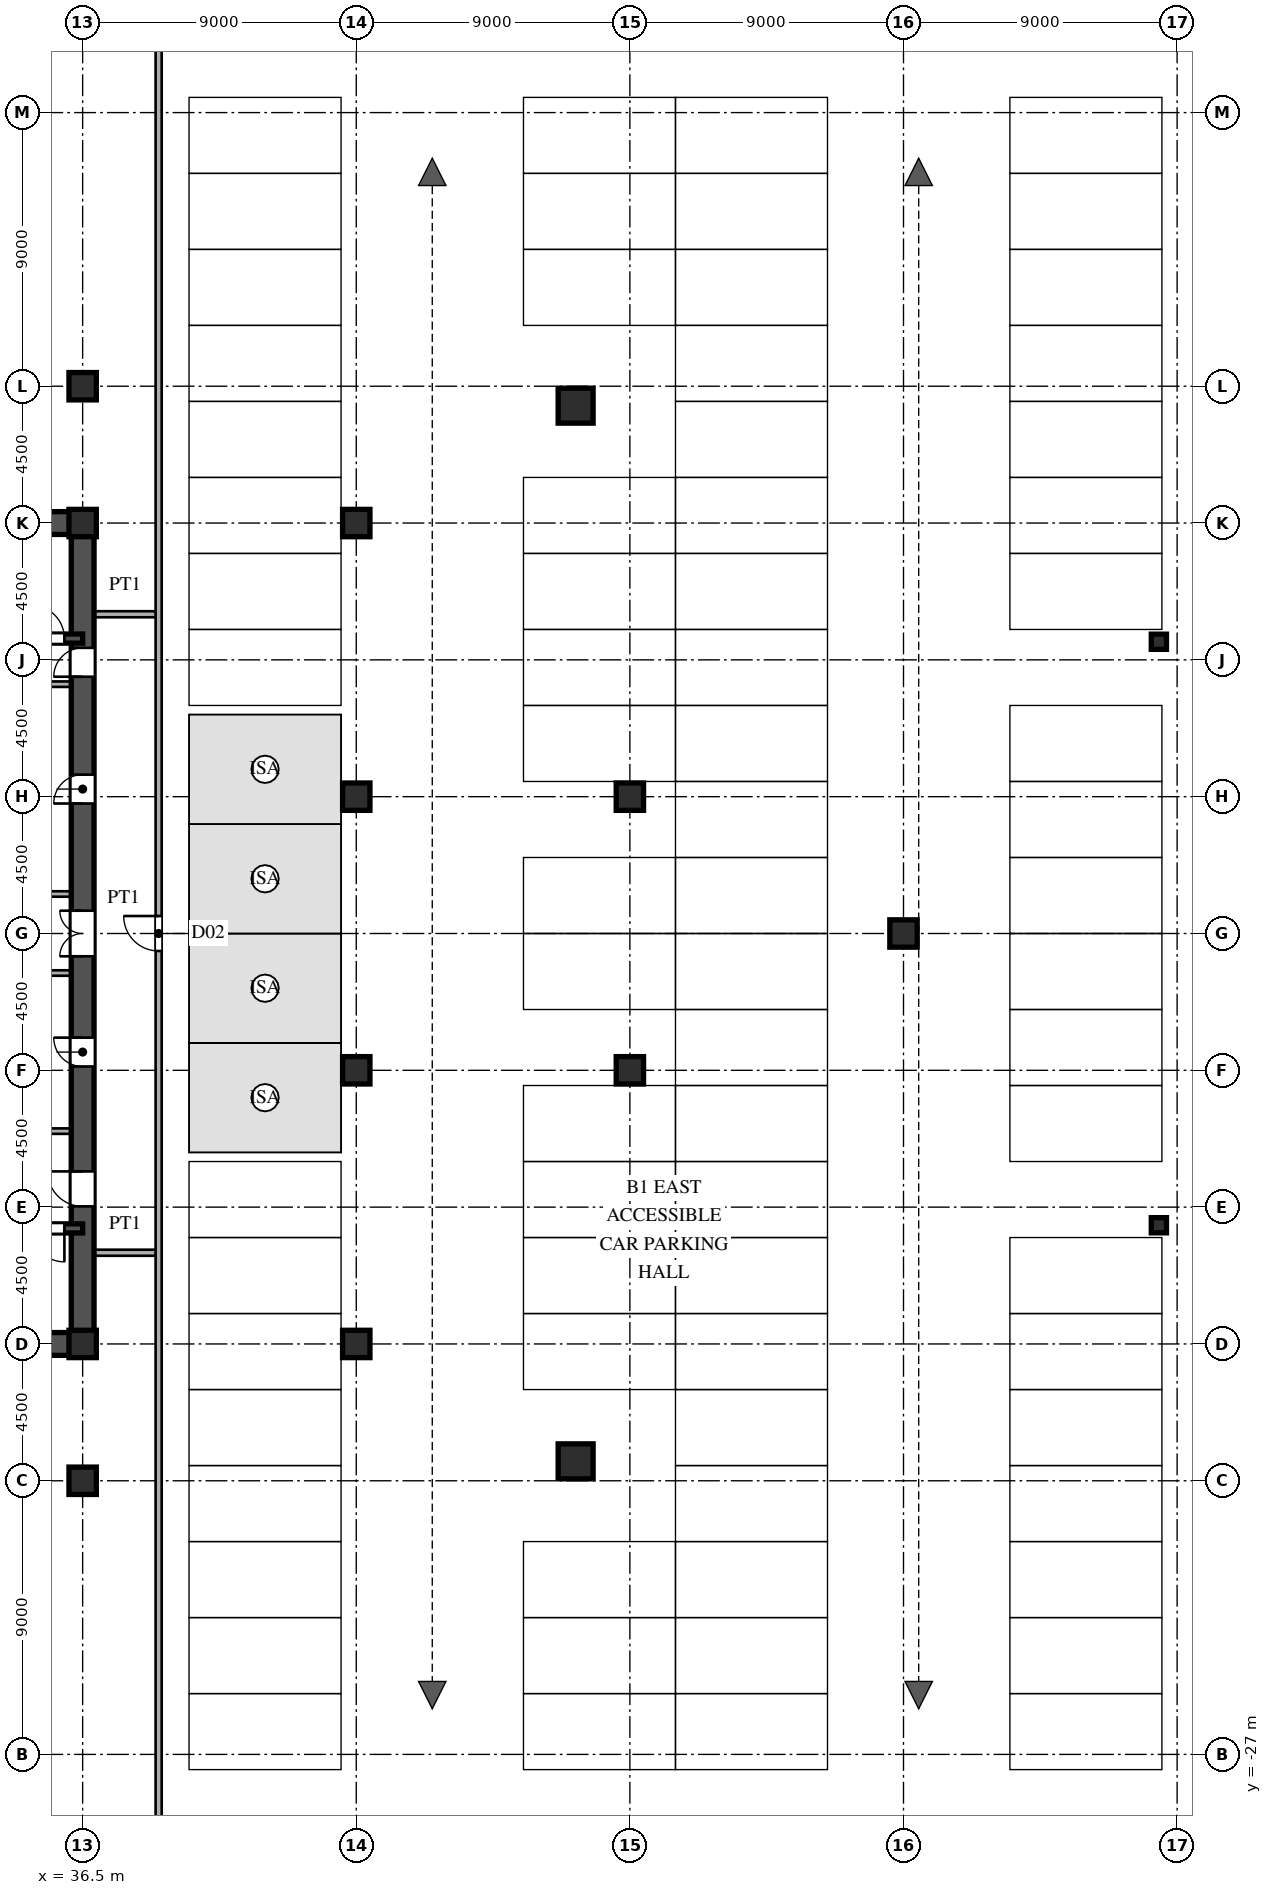
"""IFC4 building model, lengths in metres.
Left out: names, types, materials, properties, quantities, classifications, styles, units other than length and angle.
Written with IfcOpenShell. Run it as: python <this file> out.ifc"""

import sys

from ifc_helpers import new_model, si_unit, direction, frame, frame_2d, origin, origin_2d, place, context, subcontext, project, spatial, rectangle, hollow_rectangle, i_section, extrude, source, transform, mapped, element, fill, save


model = new_model("IFC4")
c1 = context("Model", 3, precision=1e-05, world=origin(), true_north=direction((0.0, 1.0)))
c2 = subcontext(c1, "Body", "Model", "MODEL_VIEW")
j1 = project(units=[si_unit("LENGTHUNIT", "METRE"), si_unit("PLANEANGLEUNIT", "RADIAN")], contexts=[c1])
p1 = place(None, origin())
s1 = spatial("IfcSite", under=j1, at=p1, CompositionType="ELEMENT")
p2 = place(p1, origin())
s2 = spatial("IfcBuilding", under=s1, at=p2, CompositionType="ELEMENT")
p3 = place(p2, frame((0.0, 0.0, -4.8)))
s3 = spatial("IfcBuildingStorey", under=s2, at=p3, CompositionType="ELEMENT", Elevation=-4.8)
m1 = source(origin(), c2, "Body", "SweptSolid", [
    extrude(i_section(OverallWidth=0.9, OverallDepth=0.9, WebThickness=0.036, FlangeThickness=0.055, at=origin_2d()), origin(), (0.0, 0.0, 1.0), 4.8),
])
for number, where, z_axis, x_axis in (
    (1, (36.5, -18.0, 0.0), (0.0, 0.0, 1.0), (1.0, 0.0, 0.0)),
    (2, (36.5, -13.5, 0.0), (0.0, 0.0, 1.0), (1.0, 0.0, 0.0)),
    (3, (36.5, 13.5, 0.0), (0.0, 0.0, 1.0), (1.0, 0.0, 0.0)),
    (4, (36.5, 18.0, 0.0), (0.0, 0.0, 1.0), (1.0, 0.0, 0.0)),
    (5, (45.5, -13.5, 0.0), (0.0, 0.0, 1.0), (1.0, 0.0, 0.0)),
    (6, (45.5, -4.5, 0.0), (0.0, 0.0, 1.0), (1.0, 0.0, 0.0)),
    (7, (45.5, 4.5, 0.0), (0.0, 0.0, 1.0), (1.0, 0.0, 0.0)),
    (8, (45.5, 13.5, 0.0), (0.0, 0.0, 1.0), (1.0, 0.0, 0.0)),
    (9, (54.5, -4.5, 0.0), (0.0, 0.0, 1.0), (1.0, 0.0, 0.0)),
    (10, (54.5, 4.5, 0.0), (0.0, 0.0, 1.0), (1.0, 0.0, 0.0)),
    (11, (63.5, 0.0, 0.0), (0.0, 0.0, 1.0), (1.0, 0.0, 0.0)),
):
    element("IfcColumn", number, at=place(p3, frame(where, z_axis=z_axis, x_axis=x_axis)), inside=s3, PredefinedType="COLUMN", context=c2, shape_type="MappedRepresentation", body=[
        mapped(m1, transform((0.0, 0.0, 0.0), scale=1.0)),
    ])
m2 = source(origin(), c2, "Body", "SweptSolid", [
    extrude(hollow_rectangle(XDim=0.5, YDim=0.5, WallThickness=0.02, at=origin_2d()), origin(), (0.0, 0.0, 1.0), 4.8),
])
for number, where, z_axis, x_axis in (
    (12, (71.9, -9.596, 0.0), (0.0, 0.0, 1.0), (1.0, 0.0, 0.0)),
    (13, (71.9, 9.596, 0.0), (0.0, 0.0, 1.0), (1.0, 0.0, 0.0)),
):
    element("IfcColumn", number, at=place(p3, frame(where, z_axis=z_axis, x_axis=x_axis)), inside=s3, PredefinedType="COLUMN", context=c2, shape_type="MappedRepresentation", body=[
        mapped(m2, transform((0.0, 0.0, 0.0), scale=1.0)),
    ])
m3 = source(origin(), c2, "Body", "SweptSolid", [
    extrude(hollow_rectangle(XDim=1.15, YDim=1.15, WallThickness=0.048, at=origin_2d()), origin(), (0.0, 0.0, 1.0), 4.8),
])
for number, where, z_axis, x_axis in (
    (14, (52.716, -17.361, 0.0), (0.0, 0.0, 1.0), (1.0, 0.0, 0.0)),
    (15, (52.716, 17.361, 0.0), (0.0, 0.0, 1.0), (1.0, 0.0, 0.0)),
):
    element("IfcColumn", number, at=place(p3, frame(where, z_axis=z_axis, x_axis=x_axis)), inside=s3, PredefinedType="COLUMN", context=c2, shape_type="MappedRepresentation", body=[
        mapped(m3, transform((0.0, 0.0, 0.0), scale=1.0)),
    ])
for number, where, z_axis, x_axis in (
    (16, (27.5, -13.5, 0.0), (0.0, 0.0, 1.0), (1.0, 0.0, 0.0)),
    (17, (27.5, 13.5, 0.0), (0.0, 0.0, 1.0), (1.0, 0.0, 0.0)),
):
    element("IfcWall", number, at=place(p3, frame(where, z_axis=z_axis, x_axis=x_axis)), inside=s3, PredefinedType="SHEAR", context=c2, shape_type="SweptSolid", body=[
        extrude(rectangle(XDim=9.0, YDim=0.75, at=frame_2d((4.5, 0.0))), origin(), (0.0, 0.0, 1.0), 4.52),
    ])
p4 = place(p3, frame((36.5, -13.65, 0.0), z_axis=(0.0, 0.0, 1.0), x_axis=(0.0, 1.0, 0.0)))
e18 = element("IfcWall", 18, at=p4, inside=s3, PredefinedType="SHEAR", context=c2, shape_type="SweptSolid", body=[
    extrude(rectangle(XDim=7.15, YDim=0.75, at=frame_2d((3.575, 0.0))), origin(), (0.0, 0.0, 1.0), 4.52),
])
p5 = place(p4, frame((4.675, 0.0, 0.0)))
e19 = element("IfcOpeningElement", 19, at=p5, cuts=e18, PredefinedType="OPENING", context=c2, shape_type="SweptSolid", body=[
    extrude(rectangle(XDim=1.15, YDim=2.2, at=frame_2d((0.575, 1.1))), frame((0.0, 0.385, 0.0), z_axis=(0.0, -1.0, 0.0), x_axis=(1.0, 0.0, 0.0)), (0.0, 0.0, 1.0), 0.77),
])
p6 = place(p3, frame((36.5, -1.3, 0.0), z_axis=(0.0, 0.0, 1.0), x_axis=(0.0, 1.0, 0.0)))
e20 = element("IfcWall", 20, at=p6, inside=s3, PredefinedType="SHEAR", context=c2, shape_type="SweptSolid", body=[
    extrude(rectangle(XDim=2.6, YDim=0.75, at=frame_2d((1.3, 0.0))), origin(), (0.0, 0.0, 1.0), 4.52),
])
p7 = place(p6, frame((0.55, 0.0, 0.0)))
e21 = element("IfcOpeningElement", 21, at=p7, cuts=e20, PredefinedType="OPENING", context=c2, shape_type="SweptSolid", body=[
    extrude(rectangle(XDim=1.5, YDim=2.3, at=frame_2d((0.75, 1.15))), frame((0.0, 0.385, 0.0), z_axis=(0.0, -1.0, 0.0), x_axis=(1.0, 0.0, 0.0)), (0.0, 0.0, 1.0), 0.77),
])
p8 = place(p3, frame((36.5, 8.2, 0.0), z_axis=(0.0, 0.0, 1.0), x_axis=(0.0, 1.0, 0.0)))
e22 = element("IfcWall", 22, at=p8, inside=s3, PredefinedType="SHEAR", context=c2, shape_type="SweptSolid", body=[
    extrude(rectangle(XDim=5.45, YDim=0.75, at=frame_2d((2.725, 0.0))), origin(), (0.0, 0.0, 1.0), 4.52),
])
p9 = place(p8, frame((0.245, 0.0, 0.0)))
e23 = element("IfcOpeningElement", 23, at=p9, cuts=e22, PredefinedType="OPENING", context=c2, shape_type="SweptSolid", body=[
    extrude(rectangle(XDim=0.95, YDim=2.15, at=frame_2d((0.475, 1.075))), frame((0.0, 0.385, 0.0), z_axis=(0.0, -1.0, 0.0), x_axis=(1.0, 0.0, 0.0)), (0.0, 0.0, 1.0), 0.77),
])
p10 = place(p3, frame((36.5, -6.5, 0.0), z_axis=(0.0, 0.0, 1.0), x_axis=(0.0, 1.0, 0.0)))
e24 = element("IfcWall", 24, at=p10, inside=s3, PredefinedType="SHEAR", context=c2, shape_type="SweptSolid", body=[
    extrude(rectangle(XDim=5.2, YDim=0.75, at=frame_2d((2.6, 0.0))), origin(), (0.0, 0.0, 1.0), 4.52),
])
p11 = place(p10, frame((2.125, 0.0, 0.0)))
e25 = element("IfcOpeningElement", 25, at=p11, cuts=e24, PredefinedType="OPENING", context=c2, shape_type="SweptSolid", body=[
    extrude(rectangle(XDim=0.95, YDim=2.15, at=frame_2d((0.475, 1.075))), frame((0.0, 0.385, 0.0), z_axis=(0.0, -1.0, 0.0), x_axis=(1.0, 0.0, 0.0)), (0.0, 0.0, 1.0), 0.77),
])
p12 = place(p3, frame((36.5, 1.3, 0.0), z_axis=(0.0, 0.0, 1.0), x_axis=(0.0, 1.0, 0.0)))
e26 = element("IfcWall", 26, at=p12, inside=s3, PredefinedType="SHEAR", context=c2, shape_type="SweptSolid", body=[
    extrude(rectangle(XDim=6.9, YDim=0.75, at=frame_2d((3.45, 0.0))), origin(), (0.0, 0.0, 1.0), 4.52),
])
p13 = place(p12, frame((2.975, 0.0, 0.0)))
e27 = element("IfcOpeningElement", 27, at=p13, cuts=e26, PredefinedType="OPENING", context=c2, shape_type="SweptSolid", body=[
    extrude(rectangle(XDim=0.95, YDim=2.15, at=frame_2d((0.475, 1.075))), frame((0.0, 0.385, 0.0), z_axis=(0.0, -1.0, 0.0), x_axis=(1.0, 0.0, 0.0)), (0.0, 0.0, 1.0), 0.77),
])
p14 = place(p3, frame((27.5, -9.7, 0.0), z_axis=(0.0, 0.0, 1.0), x_axis=(1.0, 0.0, 0.0)))
e28 = element("IfcWall", 28, at=p14, inside=s3, PredefinedType="SHEAR", context=c2, shape_type="SweptSolid", body=[
    extrude(rectangle(XDim=9.0, YDim=0.3, at=frame_2d((4.5, 0.0))), origin(), (0.0, 0.0, 1.0), 4.52),
])
p15 = place(p14, frame((7.3, 0.0, 0.0)))
e29 = element("IfcOpeningElement", 29, at=p15, cuts=e28, PredefinedType="OPENING", context=c2, shape_type="SweptSolid", body=[
    extrude(rectangle(XDim=1.1, YDim=2.2, at=frame_2d((0.55, 1.1))), frame((0.0, 0.16, 0.0), z_axis=(0.0, -1.0, 0.0), x_axis=(1.0, 0.0, 0.0)), (0.0, 0.0, 1.0), 0.32),
])
p16 = place(p3, frame((27.5, 9.7, 0.0), z_axis=(0.0, 0.0, 1.0), x_axis=(1.0, 0.0, 0.0)))
e30 = element("IfcWall", 30, at=p16, inside=s3, PredefinedType="SHEAR", context=c2, shape_type="SweptSolid", body=[
    extrude(rectangle(XDim=9.0, YDim=0.3, at=frame_2d((4.5, 0.0))), origin(), (0.0, 0.0, 1.0), 4.52),
])
p17 = place(p16, frame((7.3, 0.0, 0.0)))
e31 = element("IfcOpeningElement", 31, at=p17, cuts=e30, PredefinedType="OPENING", context=c2, shape_type="SweptSolid", body=[
    extrude(rectangle(XDim=1.1, YDim=2.2, at=frame_2d((0.55, 1.1))), frame((0.0, 0.16, 0.0), z_axis=(0.0, -1.0, 0.0), x_axis=(1.0, 0.0, 0.0)), (0.0, 0.0, 1.0), 0.32),
])
for number, where, z_axis, x_axis in (
    (32, (30.45, -6.5, 0.0), (0.0, 0.0, 1.0), (1.0, 0.0, 0.0)),
    (33, (30.45, 8.2, 0.0), (0.0, 0.0, 1.0), (1.0, 0.0, 0.0)),
):
    element("IfcWall", number, at=place(p3, frame(where, z_axis=z_axis, x_axis=x_axis)), inside=s3, PredefinedType="PARTITIONING", context=c2, shape_type="SweptSolid", body=[
        extrude(rectangle(XDim=5.7, YDim=0.18, at=frame_2d((2.85, 0.0))), origin(), (0.0, 0.0, 1.0), 4.52),
    ])
for number, where, z_axis, x_axis in (
    (34, (33.2, -1.3, 0.0), (0.0, 0.0, 1.0), (1.0, 0.0, 0.0)),
    (35, (33.2, 1.3, 0.0), (0.0, 0.0, 1.0), (1.0, 0.0, 0.0)),
):
    element("IfcWall", number, at=place(p3, frame(where, z_axis=z_axis, x_axis=x_axis)), inside=s3, PredefinedType="PARTITIONING", context=c2, shape_type="SweptSolid", body=[
        extrude(rectangle(XDim=2.95, YDim=0.18, at=frame_2d((1.475, 0.0))), origin(), (0.0, 0.0, 1.0), 4.52),
    ])
for number, where, z_axis, x_axis in (
    (36, (36.88, -10.5, 0.0), (0.0, 0.0, 1.0), (1.0, 0.0, 0.0)),
    (37, (36.88, 10.5, 0.0), (0.0, 0.0, 1.0), (1.0, 0.0, 0.0)),
):
    element("IfcWall", number, at=place(p3, frame(where, z_axis=z_axis, x_axis=x_axis)), inside=s3, PredefinedType="PARTITIONING", context=c2, shape_type="SweptSolid", body=[
        extrude(rectangle(XDim=2.035, YDim=0.2, at=frame_2d((1.018, 0.0))), origin(), (0.0, 0.0, 1.0), 4.52),
    ])
p18 = place(p3, frame((39.0, -35.795, 0.0), z_axis=(0.0, 0.0, 1.0), x_axis=(0.0, 1.0, 0.0)))
e38 = element("IfcWall", 38, at=p18, inside=s3, PredefinedType="PARTITIONING", context=c2, shape_type="SweptSolid", body=[
    extrude(rectangle(XDim=71.59, YDim=0.2, at=frame_2d((35.795, 0.0))), origin(), (0.0, 0.0, 1.0), 4.52),
])
p19 = place(p18, frame((35.22, 0.0, 0.0)))
e39 = element("IfcOpeningElement", 39, at=p19, cuts=e38, PredefinedType="OPENING", context=c2, shape_type="SweptSolid", body=[
    extrude(rectangle(XDim=1.15, YDim=2.2, at=frame_2d((0.575, 1.1))), frame((0.0, 0.11, 0.0), z_axis=(0.0, -1.0, 0.0), x_axis=(1.0, 0.0, 0.0)), (0.0, 0.0, 1.0), 0.22),
])
m4 = source(origin(), c2, "Body", "SweptSolid", [
    extrude(rectangle(XDim=1.15, YDim=2.2, at=frame_2d((0.575, 1.1))), frame((0.0, 0.025, 0.0), z_axis=(0.0, -1.0, 0.0), x_axis=(1.0, 0.0, 0.0)), (0.0, 0.0, 1.0), 0.05),
])
p20 = place(p5, origin())
e40 = element("IfcDoor", 40, at=p20, inside=s3, OperationType="SINGLE_SWING_RIGHT", PredefinedType="DOOR", context=c2, shape_type="MappedRepresentation", body=[
    mapped(m4, transform((0.0, 0.0, 0.0), scale=1.0)),
])
fill(e19, e40)
m5 = source(origin(), c2, "Body", "SweptSolid", [
    extrude(rectangle(XDim=1.5, YDim=2.3, at=frame_2d((0.75, 1.15))), frame((0.0, 0.025, 0.0), z_axis=(0.0, -1.0, 0.0), x_axis=(1.0, 0.0, 0.0)), (0.0, 0.0, 1.0), 0.05),
])
p21 = place(p7, origin())
e41 = element("IfcDoor", 41, at=p21, inside=s3, OperationType="DOUBLE_SWING_LEFT", PredefinedType="DOOR", context=c2, shape_type="MappedRepresentation", body=[
    mapped(m5, transform((0.0, 0.0, 0.0), scale=1.0)),
])
fill(e21, e41)
m6 = source(origin(), c2, "Body", "SweptSolid", [
    extrude(rectangle(XDim=0.95, YDim=2.15, at=frame_2d((0.475, 1.075))), frame((0.0, 0.025, 0.0), z_axis=(0.0, -1.0, 0.0), x_axis=(1.0, 0.0, 0.0)), (0.0, 0.0, 1.0), 0.05),
])
p22 = place(p9, origin())
e42 = element("IfcDoor", 42, at=p22, inside=s3, OperationType="SINGLE_SWING_LEFT", PredefinedType="DOOR", context=c2, shape_type="MappedRepresentation", body=[
    mapped(m6, transform((0.0, 0.0, 0.0), scale=1.0)),
])
fill(e23, e42)
p23 = place(p11, origin())
e43 = element("IfcDoor", 43, at=p23, inside=s3, OperationType="SINGLE_SWING_RIGHT", PredefinedType="DOOR", context=c2, shape_type="MappedRepresentation", body=[
    mapped(m6, transform((0.0, 0.0, 0.0), scale=1.0)),
])
fill(e25, e43)
p24 = place(p13, origin())
e44 = element("IfcDoor", 44, at=p24, inside=s3, OperationType="SINGLE_SWING_LEFT", PredefinedType="DOOR", context=c2, shape_type="MappedRepresentation", body=[
    mapped(m6, transform((0.0, 0.0, 0.0), scale=1.0)),
])
fill(e27, e44)
m7 = source(origin(), c2, "Body", "SweptSolid", [
    extrude(rectangle(XDim=1.1, YDim=2.2, at=frame_2d((0.55, 1.1))), frame((0.0, 0.025, 0.0), z_axis=(0.0, -1.0, 0.0), x_axis=(1.0, 0.0, 0.0)), (0.0, 0.0, 1.0), 0.05),
])
p25 = place(p15, frame((1.1, 0.0, 0.0), z_axis=(0.0, 0.0, 1.0), x_axis=(-1.0, 0.0, 0.0)))
e45 = element("IfcDoor", 45, at=p25, inside=s3, OperationType="SINGLE_SWING_RIGHT", PredefinedType="DOOR", context=c2, shape_type="MappedRepresentation", body=[
    mapped(m7, transform((0.0, 0.0, 0.0), scale=1.0)),
])
fill(e29, e45)
p26 = place(p17, origin())
e46 = element("IfcDoor", 46, at=p26, inside=s3, OperationType="SINGLE_SWING_LEFT", PredefinedType="DOOR", context=c2, shape_type="MappedRepresentation", body=[
    mapped(m7, transform((0.0, 0.0, 0.0), scale=1.0)),
])
fill(e31, e46)
p27 = place(p19, origin())
e47 = element("IfcDoor", 47, at=p27, inside=s3, OperationType="SINGLE_SWING_RIGHT", PredefinedType="DOOR", context=c2, shape_type="MappedRepresentation", body=[
    mapped(m4, transform((0.0, 0.0, 0.0), scale=1.0)),
])
fill(e39, e47)
save(model, sys.argv[1])
